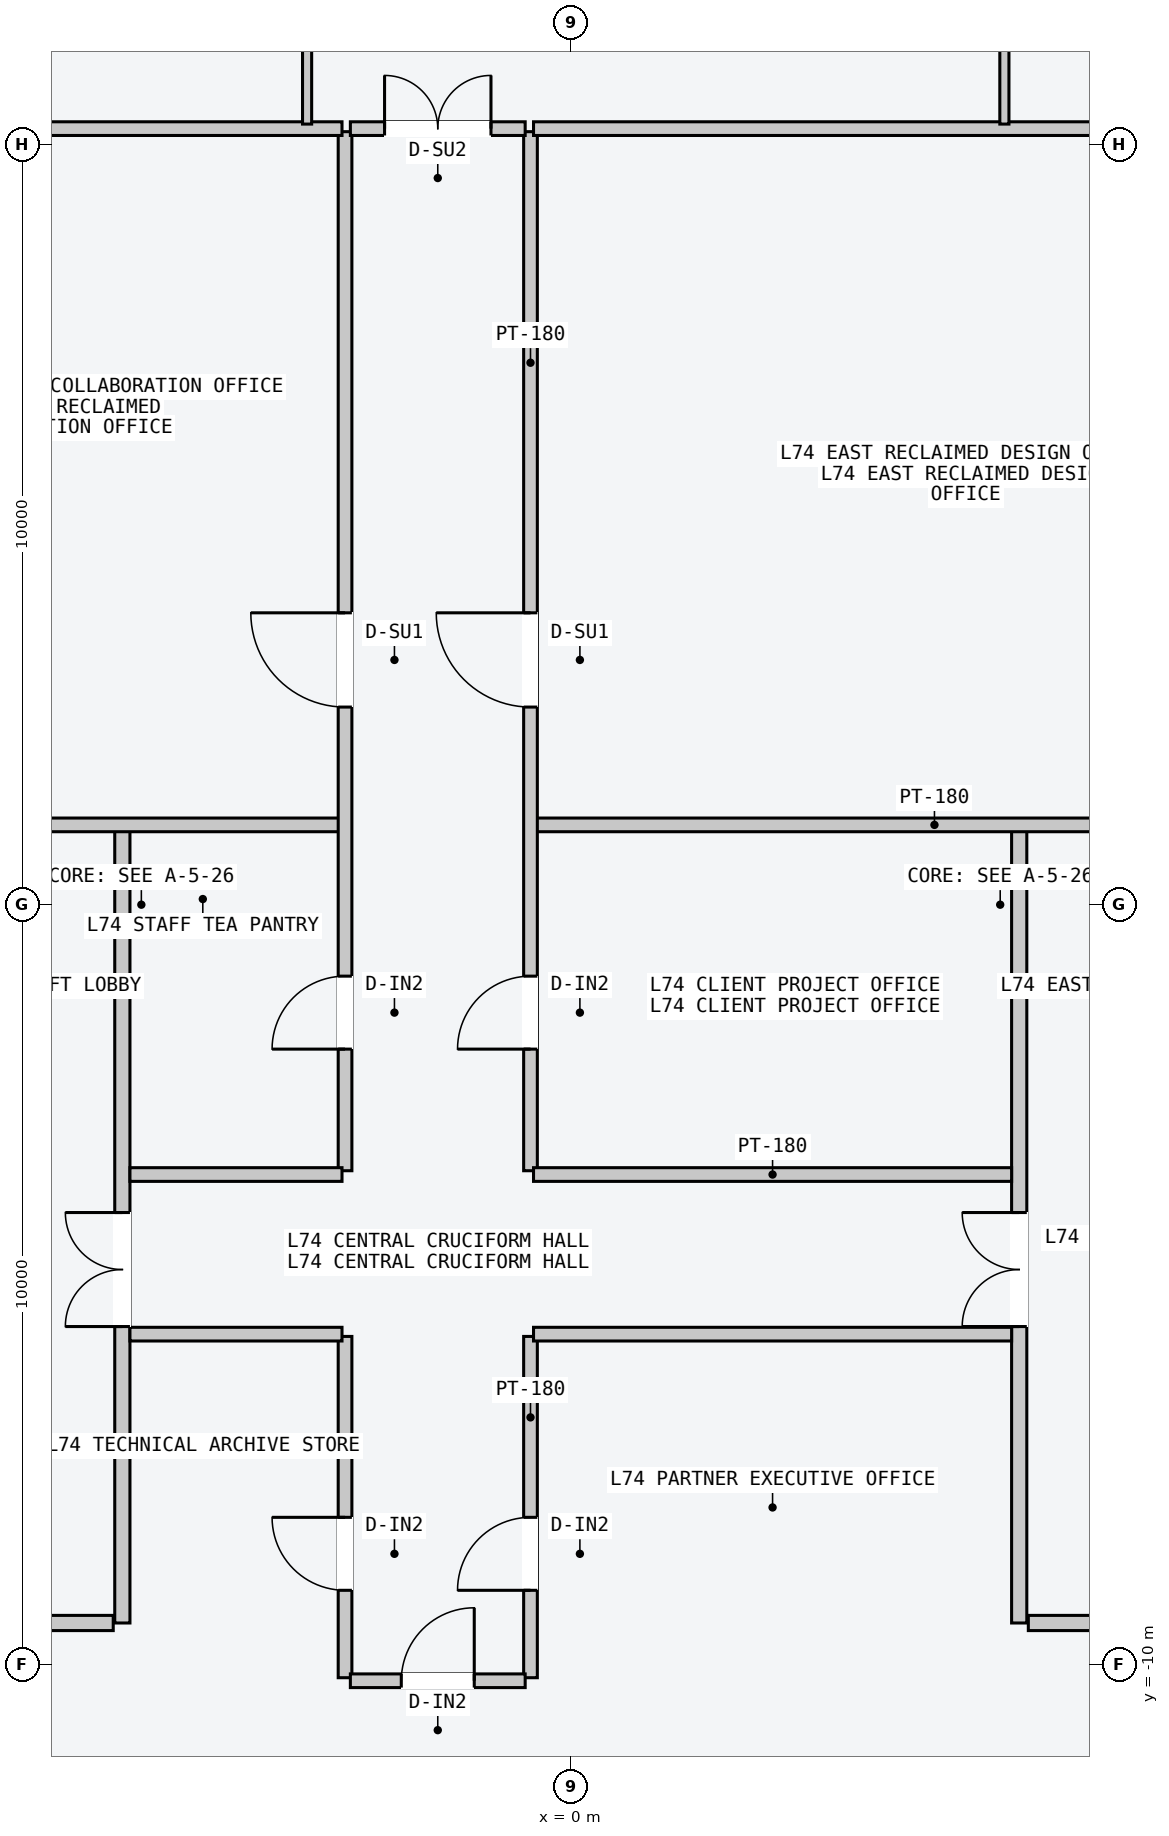
"""IFC4 building model, lengths in metres.
Left out: names, types, materials, properties, quantities, classifications, styles, units other than length and angle.
Written with IfcOpenShell. Run it as: python <this file> out.ifc"""

import sys

from ifc_helpers import new_model, si_unit, direction, frame, frame_2d, origin, place, context, subcontext, project, spatial, rectangle, extrude, element, fill, save


model = new_model("IFC4")
c1 = context("Model", 3, precision=1e-05, world=origin(), true_north=direction((0.0, 1.0)))
c2 = subcontext(c1, "Body", "Model", "MODEL_VIEW")
j1 = project(units=[si_unit("LENGTHUNIT", "METRE"), si_unit("PLANEANGLEUNIT", "RADIAN")], contexts=[c1])
p1 = place(None, origin())
s1 = spatial("IfcSite", under=j1, at=p1, CompositionType="ELEMENT")
p2 = place(p1, origin())
s2 = spatial("IfcBuilding", under=s1, at=p2, CompositionType="ELEMENT")
p3 = place(p2, frame((0.0, 0.0, 280.8)))
s3 = spatial("IfcBuildingStorey", under=s2, at=p3, CompositionType="ELEMENT", Elevation=280.8)
p4 = place(p3, frame((-5.9, -9.45, 0.0), z_axis=(0.0, 0.0, 1.0), x_axis=(0.0, 1.0, 0.0)))
e1 = element("IfcWall", 1, at=p4, inside=s3, PredefinedType="PARTITIONING", context=c2, shape_type="SweptSolid", body=[
    extrude(rectangle(XDim=10.5, YDim=0.2, at=frame_2d((5.25, 0.0))), origin(), (0.0, 0.0, 1.0), 3.4),
])
p5 = place(p4, frame((3.9, 0.0, 0.0)))
e2 = element("IfcOpeningElement", 2, at=p5, cuts=e1, PredefinedType="OPENING", context=c2, shape_type="SweptSolid", body=[
    extrude(rectangle(XDim=1.5, YDim=2.2, at=frame_2d((0.75, 1.1))), frame((0.0, 0.11, 0.0), z_axis=(0.0, -1.0, 0.0), x_axis=(1.0, 0.0, 0.0)), (0.0, 0.0, 1.0), 0.22),
])
p6 = place(p3, frame((-6.02, -9.45, 0.0), z_axis=(0.0, 0.0, 1.0), x_axis=(-1.0, 0.0, 0.0)))
e3 = element("IfcWall", 3, at=p6, inside=s3, PredefinedType="PARTITIONING", context=c2, shape_type="SweptSolid", body=[
    extrude(rectangle(XDim=1.8, YDim=0.2, at=frame_2d((0.9, 0.0))), origin(), (0.0, 0.0, 1.0), 3.4),
])
p7 = place(p3, frame((5.9, -9.45, 0.0), z_axis=(0.0, 0.0, 1.0), x_axis=(0.0, 1.0, 0.0)))
e4 = element("IfcWall", 4, at=p7, inside=s3, PredefinedType="PARTITIONING", context=c2, shape_type="SweptSolid", body=[
    extrude(rectangle(XDim=10.5, YDim=0.2, at=frame_2d((5.25, 0.0))), origin(), (0.0, 0.0, 1.0), 3.4),
])
p8 = place(p7, frame((3.9, 0.0, 0.0)))
e5 = element("IfcOpeningElement", 5, at=p8, cuts=e4, PredefinedType="OPENING", context=c2, shape_type="SweptSolid", body=[
    extrude(rectangle(XDim=1.5, YDim=2.2, at=frame_2d((0.75, 1.1))), frame((0.0, 0.11, 0.0), z_axis=(0.0, -1.0, 0.0), x_axis=(1.0, 0.0, 0.0)), (0.0, 0.0, 1.0), 0.22),
])
p9 = place(p3, frame((6.02, -9.45, 0.0), z_axis=(0.0, 0.0, 1.0), x_axis=(1.0, 0.0, 0.0)))
e6 = element("IfcWall", 6, at=p9, inside=s3, PredefinedType="PARTITIONING", context=c2, shape_type="SweptSolid", body=[
    extrude(rectangle(XDim=1.8, YDim=0.2, at=frame_2d((0.9, 0.0))), origin(), (0.0, 0.0, 1.0), 3.4),
])
p10 = place(p3, frame((-10.05, 1.05, 0.0), z_axis=(0.0, 0.0, 1.0), x_axis=(1.0, 0.0, 0.0)))
e7 = element("IfcWall", 7, at=p10, inside=s3, PredefinedType="PARTITIONING", context=c2, shape_type="SweptSolid", body=[
    extrude(rectangle(XDim=7.04, YDim=0.18, at=frame_2d((3.52, 0.0))), origin(), (0.0, 0.0, 1.0), 3.4),
])
p11 = place(p3, frame((-2.97, -3.5, 0.0), z_axis=(0.0, 0.0, 1.0), x_axis=(0.0, 1.0, 0.0)))
e8 = element("IfcWall", 8, at=p11, inside=s3, PredefinedType="PARTITIONING", context=c2, shape_type="SweptSolid", body=[
    extrude(rectangle(XDim=13.67, YDim=0.18, at=frame_2d((6.835, 0.0))), origin(), (0.0, 0.0, 1.0), 3.4),
])
p12 = place(p11, frame((6.1, 0.0, 0.0)))
e9 = element("IfcOpeningElement", 9, at=p12, cuts=e8, PredefinedType="OPENING", context=c2, shape_type="SweptSolid", body=[
    extrude(rectangle(XDim=1.24, YDim=2.24, at=frame_2d((0.62, 1.12))), frame((0.0, 0.1, 0.0), z_axis=(0.0, -1.0, 0.0), x_axis=(1.0, 0.0, 0.0)), (0.0, 0.0, 1.0), 0.2),
])
p13 = place(p11, frame((1.6, 0.0, 0.0)))
e10 = element("IfcOpeningElement", 10, at=p13, cuts=e8, PredefinedType="OPENING", context=c2, shape_type="SweptSolid", body=[
    extrude(rectangle(XDim=0.96, YDim=2.18, at=frame_2d((0.48, 1.09))), frame((0.0, 0.1, 0.0), z_axis=(0.0, -1.0, 0.0), x_axis=(1.0, 0.0, 0.0)), (0.0, 0.0, 1.0), 0.2),
])
p14 = place(p3, frame((-7.5, 10.21, 0.0), z_axis=(0.0, 0.0, 1.0), x_axis=(1.0, 0.0, 0.0)))
e11 = element("IfcWall", 11, at=p14, inside=s3, PredefinedType="PARTITIONING", context=c2, shape_type="SweptSolid", body=[
    extrude(rectangle(XDim=4.49, YDim=0.18, at=frame_2d((2.245, 0.0))), origin(), (0.0, 0.0, 1.0), 3.4),
])
p15 = place(p3, frame((-5.8, -3.55, 0.0), z_axis=(0.0, 0.0, 1.0), x_axis=(1.0, 0.0, 0.0)))
e12 = element("IfcWall", 12, at=p15, inside=s3, PredefinedType="PARTITIONING", context=c2, shape_type="SweptSolid", body=[
    extrude(rectangle(XDim=2.79, YDim=0.18, at=frame_2d((1.395, 0.0))), origin(), (0.0, 0.0, 1.0), 3.4),
])
p16 = place(p3, frame((-0.49, 1.05, 0.0), z_axis=(0.0, 0.0, 1.0), x_axis=(1.0, 0.0, 0.0)))
e13 = element("IfcWall", 13, at=p16, inside=s3, PredefinedType="PARTITIONING", context=c2, shape_type="SweptSolid", body=[
    extrude(rectangle(XDim=10.55, YDim=0.18, at=frame_2d((5.275, 0.0))), origin(), (0.0, 0.0, 1.0), 3.4),
])
p17 = place(p3, frame((-0.53, -3.5, 0.0), z_axis=(0.0, 0.0, 1.0), x_axis=(0.0, 1.0, 0.0)))
e14 = element("IfcWall", 14, at=p17, inside=s3, PredefinedType="PARTITIONING", context=c2, shape_type="SweptSolid", body=[
    extrude(rectangle(XDim=13.67, YDim=0.18, at=frame_2d((6.835, 0.0))), origin(), (0.0, 0.0, 1.0), 3.4),
])
p18 = place(p17, frame((6.1, 0.0, 0.0)))
e15 = element("IfcOpeningElement", 15, at=p18, cuts=e14, PredefinedType="OPENING", context=c2, shape_type="SweptSolid", body=[
    extrude(rectangle(XDim=1.24, YDim=2.24, at=frame_2d((0.62, 1.12))), frame((0.0, 0.1, 0.0), z_axis=(0.0, -1.0, 0.0), x_axis=(1.0, 0.0, 0.0)), (0.0, 0.0, 1.0), 0.2),
])
p19 = place(p17, frame((1.6, 0.0, 0.0)))
e16 = element("IfcOpeningElement", 16, at=p19, cuts=e14, PredefinedType="OPENING", context=c2, shape_type="SweptSolid", body=[
    extrude(rectangle(XDim=0.96, YDim=2.18, at=frame_2d((0.48, 1.09))), frame((0.0, 0.1, 0.0), z_axis=(0.0, -1.0, 0.0), x_axis=(1.0, 0.0, 0.0)), (0.0, 0.0, 1.0), 0.2),
])
p20 = place(p3, frame((-0.49, 10.21, 0.0), z_axis=(0.0, 0.0, 1.0), x_axis=(1.0, 0.0, 0.0)))
e17 = element("IfcWall", 17, at=p20, inside=s3, PredefinedType="PARTITIONING", context=c2, shape_type="SweptSolid", body=[
    extrude(rectangle(XDim=7.99, YDim=0.18, at=frame_2d((3.995, 0.0))), origin(), (0.0, 0.0, 1.0), 3.4),
])
p21 = place(p3, frame((-0.49, -3.55, 0.0), z_axis=(0.0, 0.0, 1.0), x_axis=(1.0, 0.0, 0.0)))
e18 = element("IfcWall", 18, at=p21, inside=s3, PredefinedType="PARTITIONING", context=c2, shape_type="SweptSolid", body=[
    extrude(rectangle(XDim=6.29, YDim=0.18, at=frame_2d((3.145, 0.0))), origin(), (0.0, 0.0, 1.0), 3.4),
])
p22 = place(p3, frame((-2.97, -10.17, 0.0), z_axis=(0.0, 0.0, 1.0), x_axis=(0.0, 1.0, 0.0)))
e19 = element("IfcWall", 19, at=p22, inside=s3, PredefinedType="PARTITIONING", context=c2, shape_type="SweptSolid", body=[
    extrude(rectangle(XDim=4.49, YDim=0.18, at=frame_2d((2.245, 0.0))), origin(), (0.0, 0.0, 1.0), 3.4),
])
p23 = place(p22, frame((1.15, 0.0, 0.0)))
e20 = element("IfcOpeningElement", 20, at=p23, cuts=e19, PredefinedType="OPENING", context=c2, shape_type="SweptSolid", body=[
    extrude(rectangle(XDim=0.96, YDim=2.18, at=frame_2d((0.48, 1.09))), frame((0.0, 0.1, 0.0), z_axis=(0.0, -1.0, 0.0), x_axis=(1.0, 0.0, 0.0)), (0.0, 0.0, 1.0), 0.2),
])
p24 = place(p3, frame((-0.53, -10.17, 0.0), z_axis=(0.0, 0.0, 1.0), x_axis=(0.0, 1.0, 0.0)))
e21 = element("IfcWall", 21, at=p24, inside=s3, PredefinedType="PARTITIONING", context=c2, shape_type="SweptSolid", body=[
    extrude(rectangle(XDim=4.49, YDim=0.18, at=frame_2d((2.245, 0.0))), origin(), (0.0, 0.0, 1.0), 3.4),
])
p25 = place(p24, frame((1.15, 0.0, 0.0)))
e22 = element("IfcOpeningElement", 22, at=p25, cuts=e21, PredefinedType="OPENING", context=c2, shape_type="SweptSolid", body=[
    extrude(rectangle(XDim=0.96, YDim=2.18, at=frame_2d((0.48, 1.09))), frame((0.0, 0.1, 0.0), z_axis=(0.0, -1.0, 0.0), x_axis=(1.0, 0.0, 0.0)), (0.0, 0.0, 1.0), 0.2),
])
p26 = place(p3, frame((-5.8, -5.65, 0.0), z_axis=(0.0, 0.0, 1.0), x_axis=(1.0, 0.0, 0.0)))
e23 = element("IfcWall", 23, at=p26, inside=s3, PredefinedType="PARTITIONING", context=c2, shape_type="SweptSolid", body=[
    extrude(rectangle(XDim=2.79, YDim=0.18, at=frame_2d((1.395, 0.0))), origin(), (0.0, 0.0, 1.0), 3.4),
])
p27 = place(p3, frame((-0.49, -5.65, 0.0), z_axis=(0.0, 0.0, 1.0), x_axis=(1.0, 0.0, 0.0)))
e24 = element("IfcWall", 24, at=p27, inside=s3, PredefinedType="PARTITIONING", context=c2, shape_type="SweptSolid", body=[
    extrude(rectangle(XDim=6.29, YDim=0.18, at=frame_2d((3.145, 0.0))), origin(), (0.0, 0.0, 1.0), 3.4),
])
p28 = place(p3, frame((-3.469, 10.27, 0.0), z_axis=(0.0, 0.0, 1.0), x_axis=(0.0, 1.0, 0.0)))
e25 = element("IfcWall", 25, at=p28, inside=s3, PredefinedType="PARTITIONING", context=c2, shape_type="SweptSolid", body=[
    extrude(rectangle(XDim=7.29, YDim=0.12, at=frame_2d((3.645, 0.0))), origin(), (0.0, 0.0, 1.0), 3.4),
])
p29 = place(p28, frame((1.15, 0.0, 0.0)))
e26 = element("IfcOpeningElement", 26, at=p29, cuts=e25, PredefinedType="OPENING", context=c2, shape_type="SweptSolid", body=[
    extrude(rectangle(XDim=0.96, YDim=2.18, at=frame_2d((0.48, 1.09))), frame((0.0, 0.07, 0.0), z_axis=(0.0, -1.0, 0.0), x_axis=(1.0, 0.0, 0.0)), (0.0, 0.0, 1.0), 0.14),
])
p30 = place(p3, frame((5.705, 10.27, 0.0), z_axis=(0.0, 0.0, 1.0), x_axis=(0.0, 1.0, 0.0)))
e27 = element("IfcWall", 27, at=p30, inside=s3, PredefinedType="PARTITIONING", context=c2, shape_type="SweptSolid", body=[
    extrude(rectangle(XDim=7.29, YDim=0.12, at=frame_2d((3.645, 0.0))), origin(), (0.0, 0.0, 1.0), 3.4),
])
p31 = place(p30, frame((1.15, 0.0, 0.0)))
e28 = element("IfcOpeningElement", 28, at=p31, cuts=e27, PredefinedType="OPENING", context=c2, shape_type="SweptSolid", body=[
    extrude(rectangle(XDim=0.96, YDim=2.18, at=frame_2d((0.48, 1.09))), frame((0.0, 0.07, 0.0), z_axis=(0.0, -1.0, 0.0), x_axis=(1.0, 0.0, 0.0)), (0.0, 0.0, 1.0), 0.14),
])
p32 = place(p3, frame((-2.9, 10.21, 0.0), z_axis=(0.0, 0.0, 1.0), x_axis=(1.0, 0.0, 0.0)))
e29 = element("IfcWall", 29, at=p32, inside=s3, PredefinedType="PARTITIONING", context=c2, shape_type="SweptSolid", body=[
    extrude(rectangle(XDim=2.3, YDim=0.18, at=frame_2d((1.15, 0.0))), origin(), (0.0, 0.0, 1.0), 3.4),
])
p33 = place(p32, frame((0.45, 0.0, 0.0)))
e30 = element("IfcOpeningElement", 30, at=p33, cuts=e29, PredefinedType="OPENING", context=c2, shape_type="SweptSolid", body=[
    extrude(rectangle(XDim=1.4, YDim=2.2, at=frame_2d((0.7, 1.1))), frame((0.0, 0.1, 0.0), z_axis=(0.0, -1.0, 0.0), x_axis=(1.0, 0.0, 0.0)), (0.0, 0.0, 1.0), 0.2),
])
p34 = place(p3, frame((-2.9, -10.21, 0.0), z_axis=(0.0, 0.0, 1.0), x_axis=(1.0, 0.0, 0.0)))
e31 = element("IfcWall", 31, at=p34, inside=s3, PredefinedType="PARTITIONING", context=c2, shape_type="SweptSolid", body=[
    extrude(rectangle(XDim=2.3, YDim=0.18, at=frame_2d((1.15, 0.0))), origin(), (0.0, 0.0, 1.0), 3.4),
])
p35 = place(p34, frame((0.67, 0.0, 0.0)))
e32 = element("IfcOpeningElement", 32, at=p35, cuts=e31, PredefinedType="OPENING", context=c2, shape_type="SweptSolid", body=[
    extrude(rectangle(XDim=0.96, YDim=2.18, at=frame_2d((0.48, 1.09))), frame((0.0, 0.1, 0.0), z_axis=(0.0, -1.0, 0.0), x_axis=(1.0, 0.0, 0.0)), (0.0, 0.0, 1.0), 0.2),
])
p36 = place(p5, origin())
e33 = element("IfcDoor", 33, at=p36, inside=s3, OperationType="DOUBLE_DOOR_SINGLE_SWING", PredefinedType="DOOR", context=c2, shape_type="SweptSolid", body=[
    extrude(rectangle(XDim=1.5, YDim=2.2, at=frame_2d((0.75, 1.1))), frame((0.0, 0.025, 0.0), z_axis=(0.0, -1.0, 0.0), x_axis=(1.0, 0.0, 0.0)), (0.0, 0.0, 1.0), 0.05),
])
fill(e2, e33)
p37 = place(p8, origin())
e34 = element("IfcDoor", 34, at=p37, inside=s3, OperationType="DOUBLE_DOOR_SINGLE_SWING", PredefinedType="DOOR", context=c2, shape_type="SweptSolid", body=[
    extrude(rectangle(XDim=1.5, YDim=2.2, at=frame_2d((0.75, 1.1))), frame((0.0, 0.025, 0.0), z_axis=(0.0, -1.0, 0.0), x_axis=(1.0, 0.0, 0.0)), (0.0, 0.0, 1.0), 0.05),
])
fill(e5, e34)
p38 = place(p12, origin())
e35 = element("IfcDoor", 35, at=p38, inside=s3, OperationType="SINGLE_SWING_RIGHT", PredefinedType="DOOR", context=c2, shape_type="SweptSolid", body=[
    extrude(rectangle(XDim=1.24, YDim=2.24, at=frame_2d((0.62, 1.12))), frame((0.0, 0.025, 0.0), z_axis=(0.0, -1.0, 0.0), x_axis=(1.0, 0.0, 0.0)), (0.0, 0.0, 1.0), 0.05),
])
fill(e9, e35)
p39 = place(p13, origin())
e36 = element("IfcDoor", 36, at=p39, inside=s3, OperationType="SINGLE_SWING_LEFT", PredefinedType="DOOR", context=c2, shape_type="SweptSolid", body=[
    extrude(rectangle(XDim=0.96, YDim=2.18, at=frame_2d((0.48, 1.09))), frame((0.0, 0.025, 0.0), z_axis=(0.0, -1.0, 0.0), x_axis=(1.0, 0.0, 0.0)), (0.0, 0.0, 1.0), 0.05),
])
fill(e10, e36)
p40 = place(p18, origin())
e37 = element("IfcDoor", 37, at=p40, inside=s3, OperationType="SINGLE_SWING_RIGHT", PredefinedType="DOOR", context=c2, shape_type="SweptSolid", body=[
    extrude(rectangle(XDim=1.24, YDim=2.24, at=frame_2d((0.62, 1.12))), frame((0.0, 0.025, 0.0), z_axis=(0.0, -1.0, 0.0), x_axis=(1.0, 0.0, 0.0)), (0.0, 0.0, 1.0), 0.05),
])
fill(e15, e37)
p41 = place(p19, origin())
e38 = element("IfcDoor", 38, at=p41, inside=s3, OperationType="SINGLE_SWING_LEFT", PredefinedType="DOOR", context=c2, shape_type="SweptSolid", body=[
    extrude(rectangle(XDim=0.96, YDim=2.18, at=frame_2d((0.48, 1.09))), frame((0.0, 0.025, 0.0), z_axis=(0.0, -1.0, 0.0), x_axis=(1.0, 0.0, 0.0)), (0.0, 0.0, 1.0), 0.05),
])
fill(e16, e38)
p42 = place(p23, origin())
e39 = element("IfcDoor", 39, at=p42, inside=s3, OperationType="SINGLE_SWING_RIGHT", PredefinedType="DOOR", context=c2, shape_type="SweptSolid", body=[
    extrude(rectangle(XDim=0.96, YDim=2.18, at=frame_2d((0.48, 1.09))), frame((0.0, 0.025, 0.0), z_axis=(0.0, -1.0, 0.0), x_axis=(1.0, 0.0, 0.0)), (0.0, 0.0, 1.0), 0.05),
])
fill(e20, e39)
p43 = place(p25, origin())
e40 = element("IfcDoor", 40, at=p43, inside=s3, OperationType="SINGLE_SWING_LEFT", PredefinedType="DOOR", context=c2, shape_type="SweptSolid", body=[
    extrude(rectangle(XDim=0.96, YDim=2.18, at=frame_2d((0.48, 1.09))), frame((0.0, 0.025, 0.0), z_axis=(0.0, -1.0, 0.0), x_axis=(1.0, 0.0, 0.0)), (0.0, 0.0, 1.0), 0.05),
])
fill(e22, e40)
p44 = place(p33, origin())
e41 = element("IfcDoor", 41, at=p44, inside=s3, OperationType="DOUBLE_DOOR_SINGLE_SWING", PredefinedType="DOOR", context=c2, shape_type="SweptSolid", body=[
    extrude(rectangle(XDim=1.4, YDim=2.2, at=frame_2d((0.7, 1.1))), frame((0.0, 0.025, 0.0), z_axis=(0.0, -1.0, 0.0), x_axis=(1.0, 0.0, 0.0)), (0.0, 0.0, 1.0), 0.05),
])
fill(e30, e41)
p45 = place(p35, origin())
e42 = element("IfcDoor", 42, at=p45, inside=s3, OperationType="SINGLE_SWING_RIGHT", PredefinedType="DOOR", context=c2, shape_type="SweptSolid", body=[
    extrude(rectangle(XDim=0.96, YDim=2.18, at=frame_2d((0.48, 1.09))), frame((0.0, 0.025, 0.0), z_axis=(0.0, -1.0, 0.0), x_axis=(1.0, 0.0, 0.0)), (0.0, 0.0, 1.0), 0.05),
])
fill(e32, e42)
save(model, sys.argv[1])
